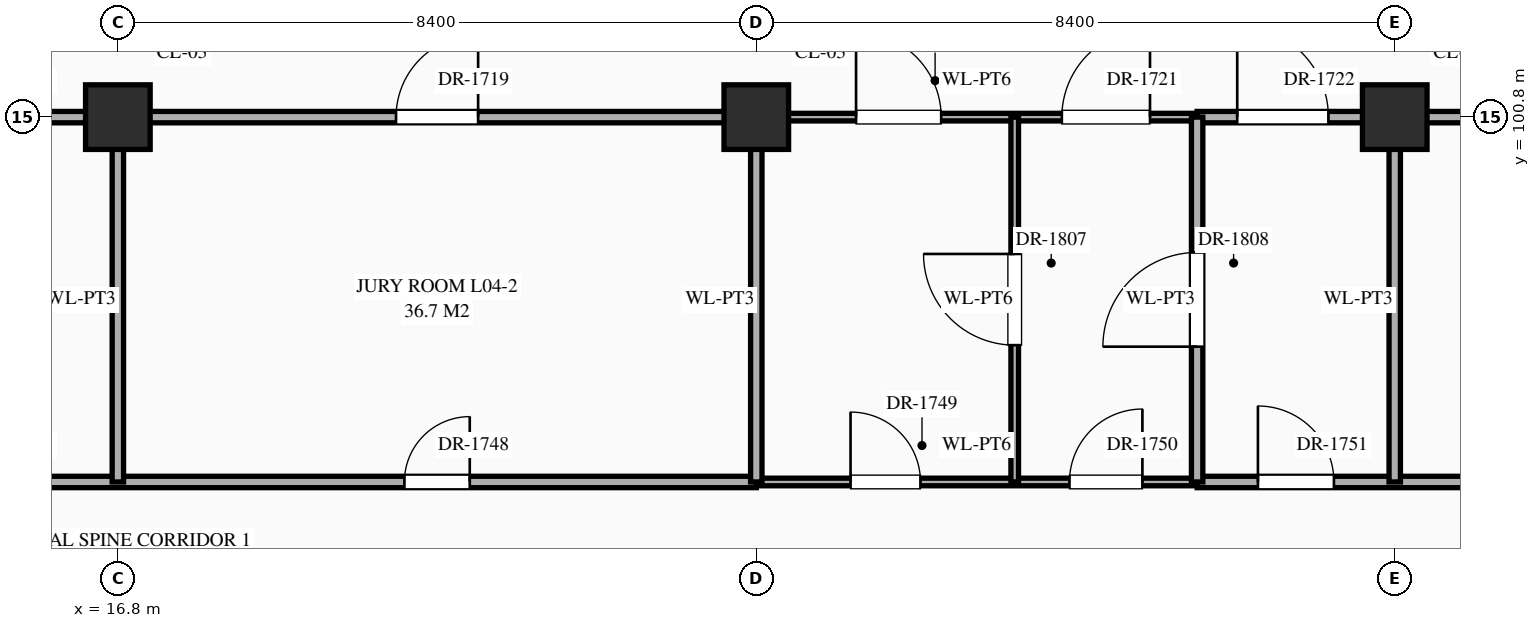
"""IFC4 building model, lengths in metres.
Left out: names, types, materials, properties, quantities, classifications, styles, units other than length and angle.
Written with IfcOpenShell. Run it as: python <this file> out.ifc"""

import sys

from ifc_helpers import new_model, si_unit, direction, frame, frame_2d, origin, origin_2d, place, context, subcontext, project, spatial, rectangle, extrude, element, fill, save


model = new_model("IFC4")
c1 = context("Model", 3, precision=1e-05, world=origin(), true_north=direction((0.0, 1.0)))
c2 = subcontext(c1, "Body", "Model", "MODEL_VIEW")
j1 = project(units=[si_unit("LENGTHUNIT", "METRE"), si_unit("PLANEANGLEUNIT", "RADIAN")], contexts=[c1])
p1 = place(None, origin())
s1 = spatial("IfcSite", under=j1, at=p1, CompositionType="ELEMENT")
p2 = place(p1, origin())
s2 = spatial("IfcBuilding", under=s1, at=p2, CompositionType="ELEMENT")
p3 = place(p2, frame((0.0, 0.0, 16.2)))
s3 = spatial("IfcBuildingStorey", under=s2, at=p3, CompositionType="ELEMENT", Elevation=16.2)
for number, where, z_axis, x_axis in (
    (1, (16.8, 100.8, 0.0), (0.0, 0.0, 1.0), (1.0, 0.0, 0.0)),
    (2, (25.2, 100.8, 0.0), (0.0, 0.0, 1.0), (1.0, 0.0, 0.0)),
    (3, (33.6, 100.8, 0.0), (0.0, 0.0, 1.0), (1.0, 0.0, 0.0)),
):
    element("IfcColumn", number, at=place(p3, frame(where, z_axis=z_axis, x_axis=x_axis)), inside=s3, PredefinedType="COLUMN", context=c2, shape_type="SweptSolid", body=[
        extrude(rectangle(XDim=0.85, YDim=0.85, at=origin_2d()), origin(), (0.0, 0.0, 1.0), 5.4),
    ])
p4 = place(p3, frame((5.8, 96.0, 0.0), z_axis=(0.0, 0.0, 1.0), x_axis=(1.0, 0.0, 0.0)))
e4 = element("IfcWall", 4, at=p4, inside=s3, PredefinedType="STANDARD", context=c2, shape_type="SweptSolid", body=[
    extrude(rectangle(XDim=19.4, YDim=0.15, at=frame_2d((9.7, 0.0))), origin(), (0.0, 0.0, 1.0), 5.2),
])
p5 = place(p4, frame((0.73, 0.0, 0.0)))
e5 = element("IfcOpeningElement", 5, at=p5, cuts=e4, PredefinedType="OPENING", context=c2, shape_type="SweptSolid", body=[
    extrude(rectangle(XDim=1.14, YDim=2.4, at=frame_2d((0.57, 1.2))), frame((0.0, 0.087, 0.0), z_axis=(0.0, -1.0, 0.0), x_axis=(1.0, 0.0, 0.0)), (0.0, 0.0, 1.0), 0.174),
])
p6 = place(p4, frame((6.35, 0.0, 0.0)))
e6 = element("IfcOpeningElement", 6, at=p6, cuts=e4, PredefinedType="OPENING", context=c2, shape_type="SweptSolid", body=[
    extrude(rectangle(XDim=0.9, YDim=2.15, at=frame_2d((0.45, 1.075))), frame((0.0, 0.087, 0.0), z_axis=(0.0, -1.0, 0.0), x_axis=(1.0, 0.0, 0.0)), (0.0, 0.0, 1.0), 0.174),
])
p7 = place(p4, frame((14.77, 0.0, 0.0)))
e7 = element("IfcOpeningElement", 7, at=p7, cuts=e4, PredefinedType="OPENING", context=c2, shape_type="SweptSolid", body=[
    extrude(rectangle(XDim=0.86, YDim=2.1, at=frame_2d((0.43, 1.05))), frame((0.0, 0.087, 0.0), z_axis=(0.0, -1.0, 0.0), x_axis=(1.0, 0.0, 0.0)), (0.0, 0.0, 1.0), 0.174),
])
p8 = place(p3, frame((25.2, 96.0, 0.0), z_axis=(0.0, 0.0, 1.0), x_axis=(1.0, 0.0, 0.0)))
e8 = element("IfcWall", 8, at=p8, inside=s3, PredefinedType="STANDARD", context=c2, shape_type="SweptSolid", body=[
    extrude(rectangle(XDim=5.8, YDim=0.1, at=frame_2d((2.9, 0.0))), origin(), (0.0, 0.0, 1.0), 5.12),
])
p9 = place(p8, frame((1.24, 0.0, 0.0)))
e9 = element("IfcOpeningElement", 9, at=p9, cuts=e8, PredefinedType="OPENING", context=c2, shape_type="SweptSolid", body=[
    extrude(rectangle(XDim=0.92, YDim=2.15, at=frame_2d((0.46, 1.075))), frame((0.0, 0.062, 0.0), z_axis=(0.0, -1.0, 0.0), x_axis=(1.0, 0.0, 0.0)), (0.0, 0.0, 1.0), 0.124),
])
p10 = place(p8, frame((4.12, 0.0, 0.0)))
e10 = element("IfcOpeningElement", 10, at=p10, cuts=e8, PredefinedType="OPENING", context=c2, shape_type="SweptSolid", body=[
    extrude(rectangle(XDim=0.96, YDim=2.2, at=frame_2d((0.48, 1.1))), frame((0.0, 0.062, 0.0), z_axis=(0.0, -1.0, 0.0), x_axis=(1.0, 0.0, 0.0)), (0.0, 0.0, 1.0), 0.124),
])
p11 = place(p3, frame((31.0, 96.0, 0.0), z_axis=(0.0, 0.0, 1.0), x_axis=(1.0, 0.0, 0.0)))
e11 = element("IfcWall", 11, at=p11, inside=s3, PredefinedType="STANDARD", context=c2, shape_type="SweptSolid", body=[
    extrude(rectangle(XDim=19.4, YDim=0.15, at=frame_2d((9.7, 0.0))), origin(), (0.0, 0.0, 1.0), 5.12),
])
p12 = place(p11, frame((0.8, 0.0, 0.0)))
e12 = element("IfcOpeningElement", 12, at=p12, cuts=e11, PredefinedType="OPENING", context=c2, shape_type="SweptSolid", body=[
    extrude(rectangle(XDim=1.0, YDim=2.25, at=frame_2d((0.5, 1.125))), frame((0.0, 0.087, 0.0), z_axis=(0.0, -1.0, 0.0), x_axis=(1.0, 0.0, 0.0)), (0.0, 0.0, 1.0), 0.174),
])
p13 = place(p11, frame((6.28, 0.0, 0.0)))
e13 = element("IfcOpeningElement", 13, at=p13, cuts=e11, PredefinedType="OPENING", context=c2, shape_type="SweptSolid", body=[
    extrude(rectangle(XDim=1.04, YDim=2.2, at=frame_2d((0.52, 1.1))), frame((0.0, 0.087, 0.0), z_axis=(0.0, -1.0, 0.0), x_axis=(1.0, 0.0, 0.0)), (0.0, 0.0, 1.0), 0.174),
])
p14 = place(p11, frame((14.66, 0.0, 0.0)))
e14 = element("IfcOpeningElement", 14, at=p14, cuts=e11, PredefinedType="OPENING", context=c2, shape_type="SweptSolid", body=[
    extrude(rectangle(XDim=1.08, YDim=2.25, at=frame_2d((0.54, 1.125))), frame((0.0, 0.087, 0.0), z_axis=(0.0, -1.0, 0.0), x_axis=(1.0, 0.0, 0.0)), (0.0, 0.0, 1.0), 0.174),
])
p15 = place(p3, frame((5.8, 100.8, 0.0), z_axis=(0.0, 0.0, 1.0), x_axis=(1.0, 0.0, 0.0)))
e15 = element("IfcWall", 15, at=p15, inside=s3, PredefinedType="STANDARD", context=c2, shape_type="SweptSolid", body=[
    extrude(rectangle(XDim=19.4, YDim=0.15, at=frame_2d((9.7, 0.0))), origin(), (0.0, 0.0, 1.0), 4.2),
])
p16 = place(p15, frame((0.627, 0.0, 0.0)))
e16 = element("IfcOpeningElement", 16, at=p16, cuts=e15, PredefinedType="OPENING", context=c2, shape_type="SweptSolid", body=[
    extrude(rectangle(XDim=1.0, YDim=2.25, at=frame_2d((0.5, 1.125))), frame((0.0, 0.087, 0.0), z_axis=(0.0, -1.0, 0.0), x_axis=(1.0, 0.0, 0.0)), (0.0, 0.0, 1.0), 0.174),
])
p17 = place(p15, frame((6.28, 0.0, 0.0)))
e17 = element("IfcOpeningElement", 17, at=p17, cuts=e15, PredefinedType="OPENING", context=c2, shape_type="SweptSolid", body=[
    extrude(rectangle(XDim=1.04, YDim=2.2, at=frame_2d((0.52, 1.1))), frame((0.0, 0.087, 0.0), z_axis=(0.0, -1.0, 0.0), x_axis=(1.0, 0.0, 0.0)), (0.0, 0.0, 1.0), 0.174),
])
p18 = place(p15, frame((14.66, 0.0, 0.0)))
e18 = element("IfcOpeningElement", 18, at=p18, cuts=e15, PredefinedType="OPENING", context=c2, shape_type="SweptSolid", body=[
    extrude(rectangle(XDim=1.08, YDim=2.25, at=frame_2d((0.54, 1.125))), frame((0.0, 0.087, 0.0), z_axis=(0.0, -1.0, 0.0), x_axis=(1.0, 0.0, 0.0)), (0.0, 0.0, 1.0), 0.174),
])
p19 = place(p3, frame((25.2, 100.8, 0.0), z_axis=(0.0, 0.0, 1.0), x_axis=(1.0, 0.0, 0.0)))
e19 = element("IfcWall", 19, at=p19, inside=s3, PredefinedType="STANDARD", context=c2, shape_type="SweptSolid", body=[
    extrude(rectangle(XDim=5.8, YDim=0.1, at=frame_2d((2.9, 0.0))), origin(), (0.0, 0.0, 1.0), 4.27),
])
p20 = place(p19, frame((1.312, 0.0, 0.0)))
e20 = element("IfcOpeningElement", 20, at=p20, cuts=e19, PredefinedType="OPENING", context=c2, shape_type="SweptSolid", body=[
    extrude(rectangle(XDim=1.12, YDim=2.25, at=frame_2d((0.56, 1.125))), frame((0.0, 0.062, 0.0), z_axis=(0.0, -1.0, 0.0), x_axis=(1.0, 0.0, 0.0)), (0.0, 0.0, 1.0), 0.124),
])
p21 = place(p19, frame((4.02, 0.0, 0.0)))
e21 = element("IfcOpeningElement", 21, at=p21, cuts=e19, PredefinedType="OPENING", context=c2, shape_type="SweptSolid", body=[
    extrude(rectangle(XDim=1.16, YDim=2.3, at=frame_2d((0.58, 1.15))), frame((0.0, 0.062, 0.0), z_axis=(0.0, -1.0, 0.0), x_axis=(1.0, 0.0, 0.0)), (0.0, 0.0, 1.0), 0.124),
])
p22 = place(p3, frame((31.0, 100.8, 0.0), z_axis=(0.0, 0.0, 1.0), x_axis=(1.0, 0.0, 0.0)))
e22 = element("IfcWall", 22, at=p22, inside=s3, PredefinedType="STANDARD", context=c2, shape_type="SweptSolid", body=[
    extrude(rectangle(XDim=11.0, YDim=0.15, at=frame_2d((5.5, 0.0))), origin(), (0.0, 0.0, 1.0), 4.27),
])
p23 = place(p22, frame((0.528, 0.0, 0.0)))
e23 = element("IfcOpeningElement", 23, at=p23, cuts=e22, PredefinedType="OPENING", context=c2, shape_type="SweptSolid", body=[
    extrude(rectangle(XDim=1.2, YDim=2.35, at=frame_2d((0.6, 1.175))), frame((0.0, 0.087, 0.0), z_axis=(0.0, -1.0, 0.0), x_axis=(1.0, 0.0, 0.0)), (0.0, 0.0, 1.0), 0.174),
])
p24 = place(p22, frame((6.18, 0.0, 0.0)))
e24 = element("IfcOpeningElement", 24, at=p24, cuts=e22, PredefinedType="OPENING", context=c2, shape_type="SweptSolid", body=[
    extrude(rectangle(XDim=1.24, YDim=2.3, at=frame_2d((0.62, 1.15))), frame((0.0, 0.087, 0.0), z_axis=(0.0, -1.0, 0.0), x_axis=(1.0, 0.0, 0.0)), (0.0, 0.0, 1.0), 0.174),
])
for number, where, z_axis, x_axis in (
    (25, (16.8, 96.0, 0.0), (0.0, 0.0, 1.0), (0.0, 1.0, 0.0)),
    (26, (25.2, 96.0, 0.0), (0.0, 0.0, 1.0), (0.0, 1.0, 0.0)),
):
    element("IfcWall", number, at=place(p3, frame(where, z_axis=z_axis, x_axis=x_axis)), inside=s3, PredefinedType="STANDARD", context=c2, shape_type="SweptSolid", body=[
        extrude(rectangle(XDim=4.8, YDim=0.15, at=frame_2d((2.4, 0.0))), origin(), (0.0, 0.0, 1.0), 4.3),
    ])
p25 = place(p3, frame((28.6, 96.0, 0.0), z_axis=(0.0, 0.0, 1.0), x_axis=(0.0, 1.0, 0.0)))
e27 = element("IfcWall", 27, at=p25, inside=s3, PredefinedType="STANDARD", context=c2, shape_type="SweptSolid", body=[
    extrude(rectangle(XDim=4.8, YDim=0.1, at=frame_2d((2.4, 0.0))), origin(), (0.0, 0.0, 1.0), 5.12),
])
p26 = place(p25, frame((1.8, 0.0, 0.0)))
e28 = element("IfcOpeningElement", 28, at=p26, cuts=e27, PredefinedType="OPENING", context=c2, shape_type="SweptSolid", body=[
    extrude(rectangle(XDim=1.2, YDim=2.35, at=frame_2d((0.6, 1.175))), frame((0.0, 0.062, 0.0), z_axis=(0.0, -1.0, 0.0), x_axis=(1.0, 0.0, 0.0)), (0.0, 0.0, 1.0), 0.124),
])
p27 = place(p3, frame((31.0, 96.0, 0.0), z_axis=(0.0, 0.0, 1.0), x_axis=(0.0, 1.0, 0.0)))
e29 = element("IfcWall", 29, at=p27, inside=s3, PredefinedType="STANDARD", context=c2, shape_type="SweptSolid", body=[
    extrude(rectangle(XDim=4.8, YDim=0.15, at=frame_2d((2.4, 0.0))), origin(), (0.0, 0.0, 1.0), 5.12),
])
p28 = place(p27, frame((1.78, 0.0, 0.0)))
e30 = element("IfcOpeningElement", 30, at=p28, cuts=e29, PredefinedType="OPENING", context=c2, shape_type="SweptSolid", body=[
    extrude(rectangle(XDim=1.24, YDim=2.3, at=frame_2d((0.62, 1.15))), frame((0.0, 0.087, 0.0), z_axis=(0.0, -1.0, 0.0), x_axis=(1.0, 0.0, 0.0)), (0.0, 0.0, 1.0), 0.174),
])
p29 = place(p3, frame((33.6, 96.0, 0.0), z_axis=(0.0, 0.0, 1.0), x_axis=(0.0, 1.0, 0.0)))
e31 = element("IfcWall", 31, at=p29, inside=s3, PredefinedType="STANDARD", context=c2, shape_type="SweptSolid", body=[
    extrude(rectangle(XDim=4.8, YDim=0.15, at=frame_2d((2.4, 0.0))), origin(), (0.0, 0.0, 1.0), 4.37),
])
p30 = place(p18, origin())
e32 = element("IfcDoor", 32, at=p30, inside=s3, OperationType="SINGLE_SWING_RIGHT", PredefinedType="DOOR", context=c2, shape_type="SweptSolid", body=[
    extrude(rectangle(XDim=1.08, YDim=2.25, at=frame_2d((0.54, 1.125))), frame((0.0, 0.025, 0.0), z_axis=(0.0, -1.0, 0.0), x_axis=(1.0, 0.0, 0.0)), (0.0, 0.0, 1.0), 0.05),
])
fill(e18, e32)
p31 = place(p20, origin())
e33 = element("IfcDoor", 33, at=p31, inside=s3, OperationType="SINGLE_SWING_LEFT", PredefinedType="DOOR", context=c2, shape_type="SweptSolid", body=[
    extrude(rectangle(XDim=1.12, YDim=2.25, at=frame_2d((0.56, 1.125))), frame((0.0, 0.025, 0.0), z_axis=(0.0, -1.0, 0.0), x_axis=(1.0, 0.0, 0.0)), (0.0, 0.0, 1.0), 0.05),
])
fill(e20, e33)
p32 = place(p21, origin())
e34 = element("IfcDoor", 34, at=p32, inside=s3, OperationType="SINGLE_SWING_RIGHT", PredefinedType="DOOR", context=c2, shape_type="SweptSolid", body=[
    extrude(rectangle(XDim=1.16, YDim=2.3, at=frame_2d((0.58, 1.15))), frame((0.0, 0.025, 0.0), z_axis=(0.0, -1.0, 0.0), x_axis=(1.0, 0.0, 0.0)), (0.0, 0.0, 1.0), 0.05),
])
fill(e21, e34)
p33 = place(p23, origin())
e35 = element("IfcDoor", 35, at=p33, inside=s3, OperationType="SINGLE_SWING_LEFT", PredefinedType="DOOR", context=c2, shape_type="SweptSolid", body=[
    extrude(rectangle(XDim=1.2, YDim=2.35, at=frame_2d((0.6, 1.175))), frame((0.0, 0.025, 0.0), z_axis=(0.0, -1.0, 0.0), x_axis=(1.0, 0.0, 0.0)), (0.0, 0.0, 1.0), 0.05),
])
fill(e23, e35)
p34 = place(p7, origin())
e36 = element("IfcDoor", 36, at=p34, inside=s3, OperationType="SINGLE_SWING_RIGHT", PredefinedType="DOOR", context=c2, shape_type="SweptSolid", body=[
    extrude(rectangle(XDim=0.86, YDim=2.1, at=frame_2d((0.43, 1.05))), frame((0.0, 0.025, 0.0), z_axis=(0.0, -1.0, 0.0), x_axis=(1.0, 0.0, 0.0)), (0.0, 0.0, 1.0), 0.05),
])
fill(e7, e36)
p35 = place(p9, origin())
e37 = element("IfcDoor", 37, at=p35, inside=s3, OperationType="SINGLE_SWING_LEFT", PredefinedType="DOOR", context=c2, shape_type="SweptSolid", body=[
    extrude(rectangle(XDim=0.92, YDim=2.15, at=frame_2d((0.46, 1.075))), frame((0.0, 0.025, 0.0), z_axis=(0.0, -1.0, 0.0), x_axis=(1.0, 0.0, 0.0)), (0.0, 0.0, 1.0), 0.05),
])
fill(e9, e37)
p36 = place(p10, origin())
e38 = element("IfcDoor", 38, at=p36, inside=s3, OperationType="SINGLE_SWING_RIGHT", PredefinedType="DOOR", context=c2, shape_type="SweptSolid", body=[
    extrude(rectangle(XDim=0.96, YDim=2.2, at=frame_2d((0.48, 1.1))), frame((0.0, 0.025, 0.0), z_axis=(0.0, -1.0, 0.0), x_axis=(1.0, 0.0, 0.0)), (0.0, 0.0, 1.0), 0.05),
])
fill(e10, e38)
p37 = place(p12, origin())
e39 = element("IfcDoor", 39, at=p37, inside=s3, OperationType="SINGLE_SWING_LEFT", PredefinedType="DOOR", context=c2, shape_type="SweptSolid", body=[
    extrude(rectangle(XDim=1.0, YDim=2.25, at=frame_2d((0.5, 1.125))), frame((0.0, 0.025, 0.0), z_axis=(0.0, -1.0, 0.0), x_axis=(1.0, 0.0, 0.0)), (0.0, 0.0, 1.0), 0.05),
])
fill(e12, e39)
p38 = place(p26, origin())
e40 = element("IfcDoor", 40, at=p38, inside=s3, OperationType="SINGLE_SWING_RIGHT", PredefinedType="DOOR", context=c2, shape_type="SweptSolid", body=[
    extrude(rectangle(XDim=1.2, YDim=2.35, at=frame_2d((0.6, 1.175))), frame((0.0, 0.025, 0.0), z_axis=(0.0, -1.0, 0.0), x_axis=(1.0, 0.0, 0.0)), (0.0, 0.0, 1.0), 0.05),
])
fill(e28, e40)
p39 = place(p28, origin())
e41 = element("IfcDoor", 41, at=p39, inside=s3, OperationType="SINGLE_SWING_LEFT", PredefinedType="DOOR", context=c2, shape_type="SweptSolid", body=[
    extrude(rectangle(XDim=1.24, YDim=2.3, at=frame_2d((0.62, 1.15))), frame((0.0, 0.025, 0.0), z_axis=(0.0, -1.0, 0.0), x_axis=(1.0, 0.0, 0.0)), (0.0, 0.0, 1.0), 0.05),
])
fill(e30, e41)
save(model, sys.argv[1])
